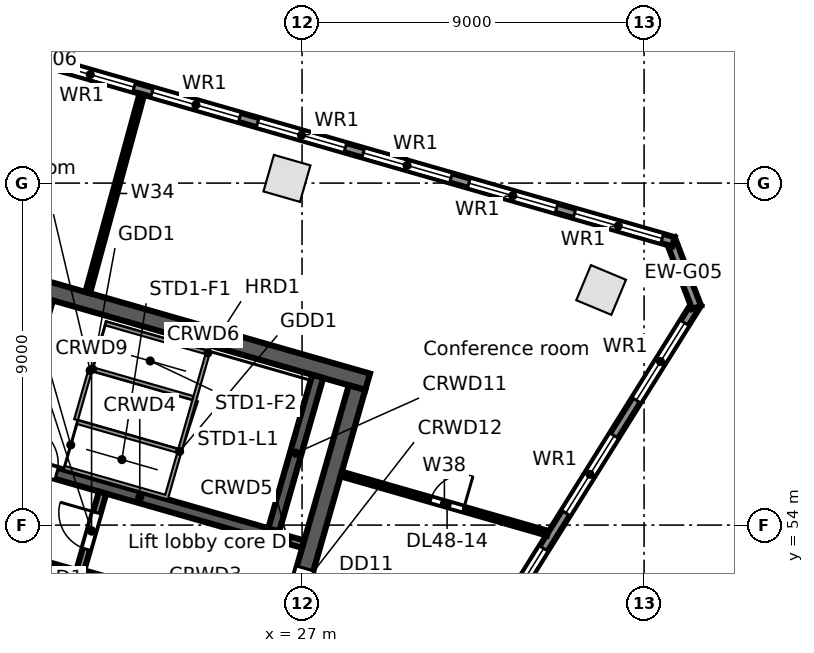
"""IFC4 building model, lengths in metres.
Left out: names, types, materials, properties, quantities, classifications, styles, units other than length and angle.
Written with IfcOpenShell. Run it as: python <this file> out.ifc"""

import sys

from ifc_helpers import new_model, si_unit, direction, frame, frame_2d, origin, origin_2d, place, context, subcontext, project, spatial, rectangle, extrude, element, fill, save


model = new_model("IFC4")
c1 = context("Model", 3, precision=1e-05, world=origin(), true_north=direction((0.0, 1.0)))
c2 = subcontext(c1, "Body", "Model", "MODEL_VIEW")
j1 = project(units=[si_unit("LENGTHUNIT", "METRE"), si_unit("PLANEANGLEUNIT", "RADIAN")], contexts=[c1])
p1 = place(None, origin())
s1 = spatial("IfcSite", under=j1, at=p1, CompositionType="ELEMENT")
p2 = place(p1, origin())
s2 = spatial("IfcBuilding", under=s1, at=p2, CompositionType="ELEMENT")
p3 = place(p2, frame((0.0, 0.0, 223.1)))
s3 = spatial("IfcBuildingStorey", under=s2, at=p3, CompositionType="ELEMENT", Elevation=223.1)
for number, where, z_axis, x_axis in (
    (1, (26.603, 63.124, 0.0), (0.0, 0.0, 1.0), (-0.961, 0.276, 0.0)),
    (2, (34.87, 60.187, 0.0), (0.0, 0.0, 1.0), (-0.923, 0.385, 0.0)),
):
    element("IfcColumn", number, at=place(p3, frame(where, z_axis=z_axis, x_axis=x_axis)), inside=s3, PredefinedType="COLUMN", context=c2, shape_type="SweptSolid", body=[
        extrude(rectangle(XDim=1.0, YDim=1.0, at=origin_2d()), origin(), (0.0, 0.0, 1.0), 3.9),
    ])
p4 = place(p3, frame((37.392, 59.84, 0.0), z_axis=(0.0, 0.0, 1.0), x_axis=(-0.529919909431, -0.848047692992, 0.0)))
e3 = element("IfcWall", 3, at=p4, inside=s3, PredefinedType="STANDARD", context=c2, shape_type="SweptSolid", body=[
    extrude(rectangle(XDim=21.104, YDim=0.25, at=frame_2d((10.552, 0.0))), origin(), (0.0, 0.0, 1.0), 3.62),
])
p5 = place(p4, frame((18.112, 0.0, 0.8)))
e4 = element("IfcOpeningElement", 4, at=p5, cuts=e3, PredefinedType="OPENING", context=c2, shape_type="SweptSolid", body=[
    extrude(rectangle(XDim=2.4, YDim=2.2, at=frame_2d((1.2, 1.1))), frame((0.0, 0.135, 0.0), z_axis=(0.0, -1.0, 0.0), x_axis=(1.0, 0.0, 0.0)), (0.0, 0.0, 1.0), 0.27),
])
p6 = place(p4, frame((14.612, 0.0, 0.8)))
e5 = element("IfcOpeningElement", 5, at=p6, cuts=e3, PredefinedType="OPENING", context=c2, shape_type="SweptSolid", body=[
    extrude(rectangle(XDim=2.4, YDim=2.2, at=frame_2d((1.2, 1.1))), frame((0.0, 0.135, 0.0), z_axis=(0.0, -1.0, 0.0), x_axis=(1.0, 0.0, 0.0)), (0.0, 0.0, 1.0), 0.27),
])
p7 = place(p4, frame((11.112, 0.0, 0.8)))
e6 = element("IfcOpeningElement", 6, at=p7, cuts=e3, PredefinedType="OPENING", context=c2, shape_type="SweptSolid", body=[
    extrude(rectangle(XDim=2.4, YDim=2.2, at=frame_2d((1.2, 1.1))), frame((0.0, 0.135, 0.0), z_axis=(0.0, -1.0, 0.0), x_axis=(1.0, 0.0, 0.0)), (0.0, 0.0, 1.0), 0.27),
])
p8 = place(p4, frame((7.612, 0.0, 0.8)))
e7 = element("IfcOpeningElement", 7, at=p8, cuts=e3, PredefinedType="OPENING", context=c2, shape_type="SweptSolid", body=[
    extrude(rectangle(XDim=2.4, YDim=2.2, at=frame_2d((1.2, 1.1))), frame((0.0, 0.135, 0.0), z_axis=(0.0, -1.0, 0.0), x_axis=(1.0, 0.0, 0.0)), (0.0, 0.0, 1.0), 0.27),
])
p9 = place(p4, frame((4.112, 0.0, 0.8)))
e8 = element("IfcOpeningElement", 8, at=p9, cuts=e3, PredefinedType="OPENING", context=c2, shape_type="SweptSolid", body=[
    extrude(rectangle(XDim=2.4, YDim=2.2, at=frame_2d((1.2, 1.1))), frame((0.0, 0.135, 0.0), z_axis=(0.0, -1.0, 0.0), x_axis=(1.0, 0.0, 0.0)), (0.0, 0.0, 1.0), 0.27),
])
p10 = place(p4, frame((0.612, 0.0, 0.8)))
e9 = element("IfcOpeningElement", 9, at=p10, cuts=e3, PredefinedType="OPENING", context=c2, shape_type="SweptSolid", body=[
    extrude(rectangle(XDim=2.4, YDim=2.2, at=frame_2d((1.2, 1.1))), frame((0.0, 0.135, 0.0), z_axis=(0.0, -1.0, 0.0), x_axis=(1.0, 0.0, 0.0)), (0.0, 0.0, 1.0), 0.27),
])
p11 = place(p3, frame((36.69, 61.531, 0.0), z_axis=(0.0, 0.0, 1.0), x_axis=(0.358377147136, -0.933576895821, 0.0)))
e10 = element("IfcWall", 10, at=p11, inside=s3, PredefinedType="STANDARD", context=c2, shape_type="SweptSolid", body=[
    extrude(rectangle(XDim=1.93, YDim=0.25, at=frame_2d((0.965, 0.0))), origin(), (0.0, 0.0, 1.0), 3.62),
])
p12 = place(p3, frame((3.34, 71.042, 0.0), z_axis=(0.0, 0.0, 1.0), x_axis=(0.96126179431, -0.275637012753, 0.0)))
e11 = element("IfcWall", 11, at=p12, inside=s3, PredefinedType="STANDARD", context=c2, shape_type="SweptSolid", body=[
    extrude(rectangle(XDim=34.779, YDim=0.25, at=frame_2d((17.39, 0.0))), origin(), (0.0, 0.0, 1.0), 3.62),
])
p13 = place(p12, frame((32.071, 0.0, 0.8)))
e12 = element("IfcOpeningElement", 12, at=p13, cuts=e11, PredefinedType="OPENING", context=c2, shape_type="SweptSolid", body=[
    extrude(rectangle(XDim=2.4, YDim=2.2, at=frame_2d((1.2, 1.1))), frame((0.0, 0.135, 0.0), z_axis=(0.0, -1.0, 0.0), x_axis=(1.0, 0.0, 0.0)), (0.0, 0.0, 1.0), 0.27),
])
p14 = place(p12, frame((29.18, 0.0, 0.8)))
e13 = element("IfcOpeningElement", 13, at=p14, cuts=e11, PredefinedType="OPENING", context=c2, shape_type="SweptSolid", body=[
    extrude(rectangle(XDim=2.4, YDim=2.2, at=frame_2d((1.2, 1.1))), frame((0.0, 0.135, 0.0), z_axis=(0.0, -1.0, 0.0), x_axis=(1.0, 0.0, 0.0)), (0.0, 0.0, 1.0), 0.27),
])
p15 = place(p12, frame((26.289, 0.0, 0.8)))
e14 = element("IfcOpeningElement", 14, at=p15, cuts=e11, PredefinedType="OPENING", context=c2, shape_type="SweptSolid", body=[
    extrude(rectangle(XDim=2.4, YDim=2.2, at=frame_2d((1.2, 1.1))), frame((0.0, 0.135, 0.0), z_axis=(0.0, -1.0, 0.0), x_axis=(1.0, 0.0, 0.0)), (0.0, 0.0, 1.0), 0.27),
])
p16 = place(p12, frame((23.398, 0.0, 0.8)))
e15 = element("IfcOpeningElement", 15, at=p16, cuts=e11, PredefinedType="OPENING", context=c2, shape_type="SweptSolid", body=[
    extrude(rectangle(XDim=2.4, YDim=2.2, at=frame_2d((1.2, 1.1))), frame((0.0, 0.135, 0.0), z_axis=(0.0, -1.0, 0.0), x_axis=(1.0, 0.0, 0.0)), (0.0, 0.0, 1.0), 0.27),
])
p17 = place(p12, frame((20.508, 0.0, 0.8)))
e16 = element("IfcOpeningElement", 16, at=p17, cuts=e11, PredefinedType="OPENING", context=c2, shape_type="SweptSolid", body=[
    extrude(rectangle(XDim=2.4, YDim=2.2, at=frame_2d((1.2, 1.1))), frame((0.0, 0.135, 0.0), z_axis=(0.0, -1.0, 0.0), x_axis=(1.0, 0.0, 0.0)), (0.0, 0.0, 1.0), 0.27),
])
p18 = place(p12, frame((17.616, 0.0, 0.8)))
e17 = element("IfcOpeningElement", 17, at=p18, cuts=e11, PredefinedType="OPENING", context=c2, shape_type="SweptSolid", body=[
    extrude(rectangle(XDim=2.4, YDim=2.2, at=frame_2d((1.2, 1.1))), frame((0.0, 0.135, 0.0), z_axis=(0.0, -1.0, 0.0), x_axis=(1.0, 0.0, 0.0)), (0.0, 0.0, 1.0), 0.27),
])
p19 = place(p12, frame((14.726, 0.0, 0.8)))
e18 = element("IfcOpeningElement", 18, at=p19, cuts=e11, PredefinedType="OPENING", context=c2, shape_type="SweptSolid", body=[
    extrude(rectangle(XDim=2.4, YDim=2.2, at=frame_2d((1.2, 1.1))), frame((0.0, 0.135, 0.0), z_axis=(0.0, -1.0, 0.0), x_axis=(1.0, 0.0, 0.0)), (0.0, 0.0, 1.0), 0.27),
])
p20 = place(p12, frame((11.834, 0.0, 0.8)))
e19 = element("IfcOpeningElement", 19, at=p20, cuts=e11, PredefinedType="OPENING", context=c2, shape_type="SweptSolid", body=[
    extrude(rectangle(XDim=2.4, YDim=2.2, at=frame_2d((1.2, 1.1))), frame((0.0, 0.135, 0.0), z_axis=(0.0, -1.0, 0.0), x_axis=(1.0, 0.0, 0.0)), (0.0, 0.0, 1.0), 0.27),
])
p21 = place(p12, frame((8.944, 0.0, 0.8)))
e20 = element("IfcOpeningElement", 20, at=p21, cuts=e11, PredefinedType="OPENING", context=c2, shape_type="SweptSolid", body=[
    extrude(rectangle(XDim=2.4, YDim=2.2, at=frame_2d((1.2, 1.1))), frame((0.0, 0.135, 0.0), z_axis=(0.0, -1.0, 0.0), x_axis=(1.0, 0.0, 0.0)), (0.0, 0.0, 1.0), 0.27),
])
p22 = place(p12, frame((6.052, 0.0, 0.8)))
e21 = element("IfcOpeningElement", 21, at=p22, cuts=e11, PredefinedType="OPENING", context=c2, shape_type="SweptSolid", body=[
    extrude(rectangle(XDim=2.4, YDim=2.2, at=frame_2d((1.2, 1.1))), frame((0.0, 0.135, 0.0), z_axis=(0.0, -1.0, 0.0), x_axis=(1.0, 0.0, 0.0)), (0.0, 0.0, 1.0), 0.27),
])
p23 = place(p12, frame((3.162, 0.0, 0.8)))
e22 = element("IfcOpeningElement", 22, at=p23, cuts=e11, PredefinedType="OPENING", context=c2, shape_type="SweptSolid", body=[
    extrude(rectangle(XDim=2.4, YDim=2.2, at=frame_2d((1.2, 1.1))), frame((0.0, 0.135, 0.0), z_axis=(0.0, -1.0, 0.0), x_axis=(1.0, 0.0, 0.0)), (0.0, 0.0, 1.0), 0.27),
])
p24 = place(p12, frame((0.271, 0.0, 0.8)))
e23 = element("IfcOpeningElement", 23, at=p24, cuts=e11, PredefinedType="OPENING", context=c2, shape_type="SweptSolid", body=[
    extrude(rectangle(XDim=2.4, YDim=2.2, at=frame_2d((1.2, 1.1))), frame((0.0, 0.135, 0.0), z_axis=(0.0, -1.0, 0.0), x_axis=(1.0, 0.0, 0.0)), (0.0, 0.0, 1.0), 0.27),
])
p25 = place(p3, frame((18.583, 53.423, 0.0), z_axis=(0.0, 0.0, 1.0), x_axis=(0.961259287968, -0.275645753268, 0.0)))
e24 = element("IfcWall", 24, at=p25, inside=s3, PredefinedType="SOLIDWALL", context=c2, shape_type="SweptSolid", body=[
    extrude(rectangle(XDim=2.65, YDim=0.2, at=frame_2d((1.325, 0.0))), origin(), (0.0, 0.0, 1.0), 3.62),
])
p26 = place(p3, frame((21.131, 52.692, 0.0), z_axis=(0.0, 0.0, 1.0), x_axis=(0.961261488075, -0.275638080722, 0.0)))
e25 = element("IfcWall", 25, at=p26, inside=s3, PredefinedType="SOLIDWALL", context=c2, shape_type="SweptSolid", body=[
    extrude(rectangle(XDim=5.45, YDim=0.3, at=frame_2d((2.725, 0.0))), origin(), (0.0, 0.0, 1.0), 3.62),
])
p27 = place(p26, frame((0.95, 0.0, 0.0)))
e26 = element("IfcOpeningElement", 26, at=p27, cuts=e25, PredefinedType="OPENING", context=c2, shape_type="SweptSolid", body=[
    extrude(rectangle(XDim=0.9, YDim=2.1, at=frame_2d((0.45, 1.05))), frame((0.0, 0.16, 0.0), z_axis=(0.0, -1.0, 0.0), x_axis=(1.0, 0.0, 0.0)), (0.0, 0.0, 1.0), 0.32),
])
p28 = place(p26, frame((3.75, 0.0, 0.0)))
e27 = element("IfcOpeningElement", 27, at=p28, cuts=e25, PredefinedType="OPENING", context=c2, shape_type="SweptSolid", body=[
    extrude(rectangle(XDim=0.9, YDim=2.1, at=frame_2d((0.45, 1.05))), frame((0.0, 0.16, 0.0), z_axis=(0.0, -1.0, 0.0), x_axis=(1.0, 0.0, 0.0)), (0.0, 0.0, 1.0), 0.32),
])
p29 = place(p3, frame((19.245, 55.73, 0.0), z_axis=(0.0, 0.0, 1.0), x_axis=(0.961263007877, -0.275632780503, 0.0)))
e28 = element("IfcWall", 28, at=p29, inside=s3, PredefinedType="SOLIDWALL", context=c2, shape_type="SweptSolid", body=[
    extrude(rectangle(XDim=7.25, YDim=0.3, at=frame_2d((3.625, 0.0))), origin(), (0.0, 0.0, 1.0), 3.62),
])
p30 = place(p29, frame((0.35, 0.0, 0.0)))
e29 = element("IfcOpeningElement", 29, at=p30, cuts=e28, PredefinedType="OPENING", context=c2, shape_type="SweptSolid", body=[
    extrude(rectangle(XDim=1.0, YDim=2.1, at=frame_2d((0.5, 1.05))), frame((0.0, 0.16, 0.0), z_axis=(0.0, -1.0, 0.0), x_axis=(1.0, 0.0, 0.0)), (0.0, 0.0, 1.0), 0.32),
])
p31 = place(p3, frame((26.214, 53.732, 0.0), z_axis=(0.0, 0.0, 1.0), x_axis=(0.961241665642, -0.275707200184, 0.0)))
e30 = element("IfcWall", 30, at=p31, inside=s3, PredefinedType="SOLIDWALL", context=c2, shape_type="SweptSolid", body=[
    extrude(rectangle(XDim=0.85, YDim=0.2, at=frame_2d((0.425, 0.0))), origin(), (0.0, 0.0, 1.0), 3.62),
])
p32 = place(p3, frame((20.073, 60.252, 0.0), z_axis=(0.0, 0.0, 1.0), x_axis=(0.96126248289, -0.275634611374, 0.0)))
e31 = element("IfcWall", 31, at=p32, inside=s3, PredefinedType="SOLIDWALL", context=c2, shape_type="SweptSolid", body=[
    extrude(rectangle(XDim=9.0, YDim=0.45, at=frame_2d((4.5, 0.0))), origin(), (0.0, 0.0, 1.0), 3.62),
])
p33 = place(p3, frame((17.168, 49.303, 0.0), z_axis=(0.0, 0.0, 1.0), x_axis=(0.275638974822, 0.961261231695, 0.0)))
e32 = element("IfcWall", 32, at=p33, inside=s3, PredefinedType="SOLIDWALL", context=c2, shape_type="SweptSolid", body=[
    extrude(rectangle(XDim=11.1, YDim=0.45, at=frame_2d((5.55, 0.0))), origin(), (0.0, 0.0, 1.0), 3.62),
])
p34 = place(p33, frame((4.95, 0.0, 0.0)))
e33 = element("IfcOpeningElement", 33, at=p34, cuts=e32, PredefinedType="OPENING", context=c2, shape_type="SweptSolid", body=[
    extrude(rectangle(XDim=1.2, YDim=2.1, at=frame_2d((0.6, 1.05))), frame((0.0, 0.235, 0.0), z_axis=(0.0, -1.0, 0.0), x_axis=(1.0, 0.0, 0.0)), (0.0, 0.0, 1.0), 0.47),
])
p35 = place(p3, frame((21.172, 52.837, 0.0), z_axis=(0.0, 0.0, 1.0), x_axis=(0.275657676022, 0.961255868981, 0.0)))
e34 = element("IfcWall", 34, at=p35, inside=s3, PredefinedType="PARTITIONING", context=c2, shape_type="SweptSolid", body=[
    extrude(rectangle(XDim=2.1, YDim=0.2, at=frame_2d((1.05, 0.0))), origin(), (0.0, 0.0, 1.0), 3.62),
])
p36 = place(p35, frame((0.55, 0.0, 0.0)))
e35 = element("IfcOpeningElement", 35, at=p36, cuts=e34, PredefinedType="OPENING", context=c2, shape_type="SweptSolid", body=[
    extrude(rectangle(XDim=1.0, YDim=2.1, at=frame_2d((0.5, 1.05))), frame((0.0, 0.11, 0.0), z_axis=(0.0, -1.0, 0.0), x_axis=(1.0, 0.0, 0.0)), (0.0, 0.0, 1.0), 0.22),
])
p37 = place(p3, frame((26.256, 53.876, 0.0), z_axis=(0.0, 0.0, 1.0), x_axis=(0.275588560745, 0.96127568636, 0.0)))
e36 = element("IfcWall", 36, at=p37, inside=s3, PredefinedType="SOLIDWALL", context=c2, shape_type="SweptSolid", body=[
    extrude(rectangle(XDim=4.2, YDim=0.3, at=frame_2d((2.1, 0.0))), origin(), (0.0, 0.0, 1.0), 3.62),
])
p38 = place(p3, frame((25.387, 46.947, 0.0), z_axis=(0.0, 0.0, 1.0), x_axis=(0.275638974822, 0.961261231695, 0.0)))
e37 = element("IfcWall", 37, at=p38, inside=s3, PredefinedType="SOLIDWALL", context=c2, shape_type="SweptSolid", body=[
    extrude(rectangle(XDim=11.1, YDim=0.45, at=frame_2d((5.55, 0.0))), origin(), (0.0, 0.0, 1.0), 3.62),
])
p39 = place(p38, frame((4.95, 0.0, 0.0)))
e38 = element("IfcOpeningElement", 38, at=p39, cuts=e37, PredefinedType="OPENING", context=c2, shape_type="SweptSolid", body=[
    extrude(rectangle(XDim=1.2, YDim=2.1, at=frame_2d((0.6, 1.05))), frame((0.0, 0.235, 0.0), z_axis=(0.0, -1.0, 0.0), x_axis=(1.0, 0.0, 0.0)), (0.0, 0.0, 1.0), 0.47),
])
p40 = place(p3, frame((21.36, 60.117, 0.0), z_axis=(0.0, 0.0, 1.0), x_axis=(0.263151767798, 0.964754449124, 0.0)))
e39 = element("IfcWall", 39, at=p40, inside=s3, PredefinedType="PARTITIONING", context=c2, shape_type="SweptSolid", body=[
    extrude(rectangle(XDim=5.411, YDim=0.125, at=frame_2d((2.705, 0.0))), origin(), (0.0, 0.0, 1.0), 3.0),
])
p41 = place(p3, frame((28.029, 55.344, 0.0), z_axis=(0.0, 0.0, 1.0), x_axis=(0.961249621014, -0.275679462603, 0.0)))
e40 = element("IfcWall", 40, at=p41, inside=s3, PredefinedType="PARTITIONING", context=c2, shape_type="SweptSolid", body=[
    extrude(rectangle(XDim=5.652, YDim=0.125, at=frame_2d((2.826, 0.0))), origin(), (0.0, 0.0, 1.0), 2.988),
])
p42 = place(p41, frame((2.45, 0.0, 0.0)))
e41 = element("IfcOpeningElement", 41, at=p42, cuts=e40, PredefinedType="OPENING", context=c2, shape_type="SweptSolid", body=[
    extrude(rectangle(XDim=0.9, YDim=2.1, at=frame_2d((0.45, 1.05))), frame((0.0, 0.073, 0.0), z_axis=(0.0, -1.0, 0.0), x_axis=(1.0, 0.0, 0.0)), (0.0, 0.0, 1.0), 0.145),
])
p43 = place(p8, origin())
e42 = element("IfcWindow", 42, at=p43, inside=s3, PartitioningType="SINGLE_PANEL", PredefinedType="WINDOW", context=c2, shape_type="SweptSolid", body=[
    extrude(rectangle(XDim=2.4, YDim=2.2, at=frame_2d((1.2, 1.1))), frame((0.0, 0.03, 0.0), z_axis=(0.0, -1.0, 0.0), x_axis=(1.0, 0.0, 0.0)), (0.0, 0.0, 1.0), 0.06),
])
fill(e7, e42)
p44 = place(p9, origin())
e43 = element("IfcWindow", 43, at=p44, inside=s3, PartitioningType="SINGLE_PANEL", PredefinedType="WINDOW", context=c2, shape_type="SweptSolid", body=[
    extrude(rectangle(XDim=2.4, YDim=2.2, at=frame_2d((1.2, 1.1))), frame((0.0, 0.03, 0.0), z_axis=(0.0, -1.0, 0.0), x_axis=(1.0, 0.0, 0.0)), (0.0, 0.0, 1.0), 0.06),
])
fill(e8, e43)
p45 = place(p10, origin())
e44 = element("IfcWindow", 44, at=p45, inside=s3, PartitioningType="SINGLE_PANEL", PredefinedType="WINDOW", context=c2, shape_type="SweptSolid", body=[
    extrude(rectangle(XDim=2.4, YDim=2.2, at=frame_2d((1.2, 1.1))), frame((0.0, 0.03, 0.0), z_axis=(0.0, -1.0, 0.0), x_axis=(1.0, 0.0, 0.0)), (0.0, 0.0, 1.0), 0.06),
])
fill(e9, e44)
p46 = place(p13, origin())
e45 = element("IfcWindow", 45, at=p46, inside=s3, PartitioningType="SINGLE_PANEL", PredefinedType="WINDOW", context=c2, shape_type="SweptSolid", body=[
    extrude(rectangle(XDim=2.4, YDim=2.2, at=frame_2d((1.2, 1.1))), frame((0.0, 0.03, 0.0), z_axis=(0.0, -1.0, 0.0), x_axis=(1.0, 0.0, 0.0)), (0.0, 0.0, 1.0), 0.06),
])
fill(e12, e45)
p47 = place(p14, origin())
e46 = element("IfcWindow", 46, at=p47, inside=s3, PartitioningType="SINGLE_PANEL", PredefinedType="WINDOW", context=c2, shape_type="SweptSolid", body=[
    extrude(rectangle(XDim=2.4, YDim=2.2, at=frame_2d((1.2, 1.1))), frame((0.0, 0.03, 0.0), z_axis=(0.0, -1.0, 0.0), x_axis=(1.0, 0.0, 0.0)), (0.0, 0.0, 1.0), 0.06),
])
fill(e13, e46)
p48 = place(p15, origin())
e47 = element("IfcWindow", 47, at=p48, inside=s3, PartitioningType="SINGLE_PANEL", PredefinedType="WINDOW", context=c2, shape_type="SweptSolid", body=[
    extrude(rectangle(XDim=2.4, YDim=2.2, at=frame_2d((1.2, 1.1))), frame((0.0, 0.03, 0.0), z_axis=(0.0, -1.0, 0.0), x_axis=(1.0, 0.0, 0.0)), (0.0, 0.0, 1.0), 0.06),
])
fill(e14, e47)
p49 = place(p16, origin())
e48 = element("IfcWindow", 48, at=p49, inside=s3, PartitioningType="SINGLE_PANEL", PredefinedType="WINDOW", context=c2, shape_type="SweptSolid", body=[
    extrude(rectangle(XDim=2.4, YDim=2.2, at=frame_2d((1.2, 1.1))), frame((0.0, 0.03, 0.0), z_axis=(0.0, -1.0, 0.0), x_axis=(1.0, 0.0, 0.0)), (0.0, 0.0, 1.0), 0.06),
])
fill(e15, e48)
p50 = place(p17, origin())
e49 = element("IfcWindow", 49, at=p50, inside=s3, PartitioningType="SINGLE_PANEL", PredefinedType="WINDOW", context=c2, shape_type="SweptSolid", body=[
    extrude(rectangle(XDim=2.4, YDim=2.2, at=frame_2d((1.2, 1.1))), frame((0.0, 0.03, 0.0), z_axis=(0.0, -1.0, 0.0), x_axis=(1.0, 0.0, 0.0)), (0.0, 0.0, 1.0), 0.06),
])
fill(e16, e49)
p51 = place(p18, origin())
e50 = element("IfcWindow", 50, at=p51, inside=s3, PartitioningType="SINGLE_PANEL", PredefinedType="WINDOW", context=c2, shape_type="SweptSolid", body=[
    extrude(rectangle(XDim=2.4, YDim=2.2, at=frame_2d((1.2, 1.1))), frame((0.0, 0.03, 0.0), z_axis=(0.0, -1.0, 0.0), x_axis=(1.0, 0.0, 0.0)), (0.0, 0.0, 1.0), 0.06),
])
fill(e17, e50)
p52 = place(p30, origin())
e51 = element("IfcDoor", 51, at=p52, inside=s3, OperationType="SINGLE_SWING_LEFT", PredefinedType="DOOR", context=c2, shape_type="SweptSolid", body=[
    extrude(rectangle(XDim=1.0, YDim=2.1, at=frame_2d((0.5, 1.05))), frame((0.0, 0.025, 0.0), z_axis=(0.0, -1.0, 0.0), x_axis=(1.0, 0.0, 0.0)), (0.0, 0.0, 1.0), 0.05),
])
fill(e29, e51)
p53 = place(p36, origin())
e52 = element("IfcDoor", 52, at=p53, inside=s3, OperationType="SINGLE_SWING_RIGHT", PredefinedType="DOOR", context=c2, shape_type="SweptSolid", body=[
    extrude(rectangle(XDim=1.0, YDim=2.1, at=frame_2d((0.5, 1.05))), frame((0.0, 0.025, 0.0), z_axis=(0.0, -1.0, 0.0), x_axis=(1.0, 0.0, 0.0)), (0.0, 0.0, 1.0), 0.05),
])
fill(e35, e52)
p54 = place(p39, frame((1.2, 0.0, 0.0), z_axis=(0.0, 0.0, 1.0), x_axis=(-1.0, 0.0, 0.0)))
e53 = element("IfcDoor", 53, at=p54, inside=s3, OperationType="SINGLE_SWING_RIGHT", PredefinedType="DOOR", context=c2, shape_type="SweptSolid", body=[
    extrude(rectangle(XDim=1.2, YDim=2.1, at=frame_2d((0.6, 1.05))), frame((0.0, 0.025, 0.0), z_axis=(0.0, -1.0, 0.0), x_axis=(1.0, 0.0, 0.0)), (0.0, 0.0, 1.0), 0.05),
])
fill(e38, e53)
p55 = place(p42, origin())
e54 = element("IfcDoor", 54, at=p55, inside=s3, OperationType="SINGLE_SWING_RIGHT", PredefinedType="DOOR", context=c2, shape_type="SweptSolid", body=[
    extrude(rectangle(XDim=0.9, YDim=2.1, at=frame_2d((0.45, 1.05))), frame((0.0, 0.025, 0.0), z_axis=(0.0, -1.0, 0.0), x_axis=(1.0, 0.0, 0.0)), (0.0, 0.0, 1.0), 0.05),
])
fill(e41, e54)
save(model, sys.argv[1])
